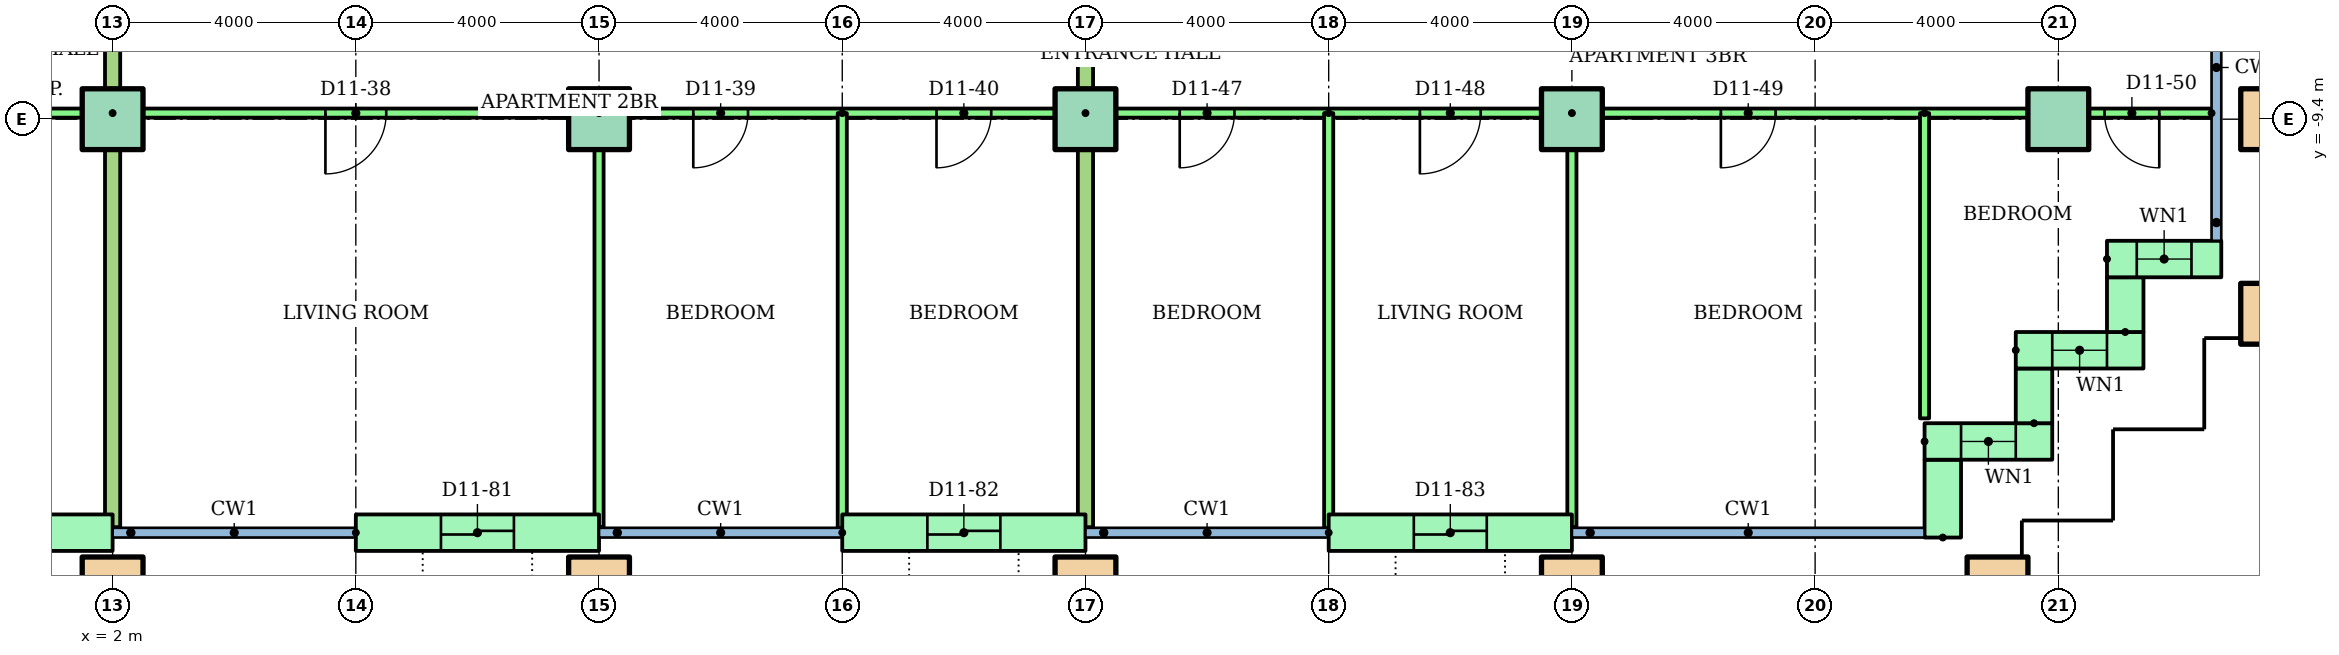
"""IFC4 building model, lengths in metres.
Left out: names, types, materials, properties, quantities, classifications, styles, units other than length and angle.
Written with IfcOpenShell. Run it as: python <this file> out.ifc"""

import sys

from ifc_helpers import new_model, si_unit, direction, frame, frame_2d, origin, origin_2d, place, context, subcontext, project, spatial, rectangle, hollow_rectangle, extrude, element, fill, save


model = new_model("IFC4")
c1 = context("Model", 3, precision=1e-05, world=origin(), true_north=direction((0.0, 1.0)))
c2 = subcontext(c1, "Body", "Model", "MODEL_VIEW")
j1 = project(units=[si_unit("LENGTHUNIT", "METRE"), si_unit("PLANEANGLEUNIT", "RADIAN")], contexts=[c1])
p1 = place(None, origin())
s1 = spatial("IfcSite", under=j1, at=p1, CompositionType="ELEMENT")
p2 = place(p1, origin())
s2 = spatial("IfcBuilding", under=s1, at=p2, CompositionType="ELEMENT")
p3 = place(p2, frame((0.0, 0.0, 44.8)))
s3 = spatial("IfcBuildingStorey", under=s2, at=p3, CompositionType="ELEMENT", Elevation=44.8)
for number, where in (
    (1, (2.0, -17.1, 0.0)),
    (2, (10.0, -17.1, 0.0)),
    (3, (18.0, -17.1, 0.0)),
    (4, (26.0, -17.1, 0.0)),
    (5, (33.0, -17.1, 0.0)),
    (6, (37.5, -12.6, 0.0)),
):
    element("IfcColumn", number, at=place(p3, frame(where)), inside=s3, PredefinedType="COLUMN", context=c2, shape_type="SweptSolid", body=[
        extrude(hollow_rectangle(XDim=1.0, YDim=1.0, WallThickness=0.05, at=origin_2d()), origin(), (0.0, 0.0, 1.0), 3.2),
    ])
for number, where in (
    (7, (2.0, -9.4, 0.0)),
    (8, (10.0, -9.4, 0.0)),
    (9, (18.0, -9.4, 0.0)),
    (10, (26.0, -9.4, 0.0)),
    (11, (34.0, -9.4, 0.0)),
):
    element("IfcColumn", number, at=place(p3, frame(where)), inside=s3, PredefinedType="COLUMN", context=c2, shape_type="SweptSolid", body=[
        extrude(rectangle(XDim=1.0, YDim=1.0, at=origin_2d()), origin(), (0.0, 0.0, 1.0), 3.2),
    ])
p4 = place(p3, frame((37.5, -9.4, 0.0)))
e12 = element("IfcColumn", 12, at=p4, inside=s3, PredefinedType="COLUMN", context=c2, shape_type="SweptSolid", body=[
    extrude(hollow_rectangle(XDim=1.0, YDim=1.0, WallThickness=0.05, at=origin_2d()), origin(), (0.0, 0.0, 1.0), 3.2),
])
p5 = place(p3, frame((-2.0, -16.2, 0.0)))
e13 = element("IfcWall", 13, at=p5, inside=s3, PredefinedType="STANDARD", context=c2, shape_type="SweptSolid", body=[
    extrude(rectangle(XDim=4.0, YDim=0.6, at=frame_2d((2.0, 0.0))), origin(), (0.0, 0.0, 1.0), 2.92),
])
p6 = place(p5, frame((1.4, 0.0, 0.0)))
e14 = element("IfcOpeningElement", 14, at=p6, cuts=e13, PredefinedType="OPENING", context=c2, shape_type="SweptSolid", body=[
    extrude(rectangle(XDim=1.2, YDim=2.1, at=frame_2d((0.6, 1.05))), frame((0.0, 0.31, 0.0), z_axis=(0.0, -1.0, 0.0), x_axis=(1.0, 0.0, 0.0)), (0.0, 0.0, 1.0), 0.62),
])
p7 = place(p3, frame((6.0, -16.2, 0.0)))
e15 = element("IfcWall", 15, at=p7, inside=s3, PredefinedType="STANDARD", context=c2, shape_type="SweptSolid", body=[
    extrude(rectangle(XDim=4.0, YDim=0.6, at=frame_2d((2.0, 0.0))), origin(), (0.0, 0.0, 1.0), 2.92),
])
p8 = place(p7, frame((1.4, 0.0, 0.0)))
e16 = element("IfcOpeningElement", 16, at=p8, cuts=e15, PredefinedType="OPENING", context=c2, shape_type="SweptSolid", body=[
    extrude(rectangle(XDim=1.2, YDim=2.1, at=frame_2d((0.6, 1.05))), frame((0.0, 0.31, 0.0), z_axis=(0.0, -1.0, 0.0), x_axis=(1.0, 0.0, 0.0)), (0.0, 0.0, 1.0), 0.62),
])
p9 = place(p3, frame((14.0, -16.2, 0.0)))
e17 = element("IfcWall", 17, at=p9, inside=s3, PredefinedType="STANDARD", context=c2, shape_type="SweptSolid", body=[
    extrude(rectangle(XDim=4.0, YDim=0.6, at=frame_2d((2.0, 0.0))), origin(), (0.0, 0.0, 1.0), 2.92),
])
p10 = place(p9, frame((1.4, 0.0, 0.0)))
e18 = element("IfcOpeningElement", 18, at=p10, cuts=e17, PredefinedType="OPENING", context=c2, shape_type="SweptSolid", body=[
    extrude(rectangle(XDim=1.2, YDim=2.1, at=frame_2d((0.6, 1.05))), frame((0.0, 0.31, 0.0), z_axis=(0.0, -1.0, 0.0), x_axis=(1.0, 0.0, 0.0)), (0.0, 0.0, 1.0), 0.62),
])
p11 = place(p3, frame((22.0, -16.2, 0.0)))
e19 = element("IfcWall", 19, at=p11, inside=s3, PredefinedType="STANDARD", context=c2, shape_type="SweptSolid", body=[
    extrude(rectangle(XDim=4.0, YDim=0.6, at=frame_2d((2.0, 0.0))), origin(), (0.0, 0.0, 1.0), 2.92),
])
p12 = place(p11, frame((1.4, 0.0, 0.0)))
e20 = element("IfcOpeningElement", 20, at=p12, cuts=e19, PredefinedType="OPENING", context=c2, shape_type="SweptSolid", body=[
    extrude(rectangle(XDim=1.2, YDim=2.1, at=frame_2d((0.6, 1.05))), frame((0.0, 0.31, 0.0), z_axis=(0.0, -1.0, 0.0), x_axis=(1.0, 0.0, 0.0)), (0.0, 0.0, 1.0), 0.62),
])
p13 = place(p3, frame((32.1, -16.28, 0.0), z_axis=(0.0, 0.0, 1.0), x_axis=(0.0, 1.0, 0.0)))
e21 = element("IfcWall", 21, at=p13, inside=s3, PredefinedType="STANDARD", context=c2, shape_type="SweptSolid", body=[
    extrude(rectangle(XDim=1.28, YDim=0.6, at=frame_2d((0.64, 0.0))), origin(), (0.0, 0.0, 1.0), 2.92),
])
p14 = place(p3, frame((31.8, -14.7, 0.0)))
e22 = element("IfcWall", 22, at=p14, inside=s3, PredefinedType="STANDARD", context=c2, shape_type="SweptSolid", body=[
    extrude(rectangle(XDim=2.1, YDim=0.6, at=frame_2d((1.05, 0.0))), origin(), (0.0, 0.0, 1.0), 2.92),
])
p15 = place(p14, frame((0.6, 0.0, 0.9)))
e23 = element("IfcOpeningElement", 23, at=p15, cuts=e22, PredefinedType="OPENING", context=c2, shape_type="SweptSolid", body=[
    extrude(rectangle(XDim=0.9, YDim=1.5, at=frame_2d((0.45, 0.75))), frame((0.0, 0.31, 0.0), z_axis=(0.0, -1.0, 0.0), x_axis=(1.0, 0.0, 0.0)), (0.0, 0.0, 1.0), 0.62),
])
p16 = place(p3, frame((33.6, -14.4, 0.0), z_axis=(0.0, 0.0, 1.0), x_axis=(0.0, 1.0, 0.0)))
e24 = element("IfcWall", 24, at=p16, inside=s3, PredefinedType="STANDARD", context=c2, shape_type="SweptSolid", body=[
    extrude(rectangle(XDim=0.9, YDim=0.6, at=frame_2d((0.45, 0.0))), origin(), (0.0, 0.0, 1.0), 2.92),
])
p17 = place(p3, frame((33.3, -13.2, 0.0)))
e25 = element("IfcWall", 25, at=p17, inside=s3, PredefinedType="STANDARD", context=c2, shape_type="SweptSolid", body=[
    extrude(rectangle(XDim=2.1, YDim=0.6, at=frame_2d((1.05, 0.0))), origin(), (0.0, 0.0, 1.0), 2.92),
])
p18 = place(p17, frame((0.6, 0.0, 0.9)))
e26 = element("IfcOpeningElement", 26, at=p18, cuts=e25, PredefinedType="OPENING", context=c2, shape_type="SweptSolid", body=[
    extrude(rectangle(XDim=0.9, YDim=1.5, at=frame_2d((0.45, 0.75))), frame((0.0, 0.31, 0.0), z_axis=(0.0, -1.0, 0.0), x_axis=(1.0, 0.0, 0.0)), (0.0, 0.0, 1.0), 0.62),
])
p19 = place(p3, frame((35.1, -12.9, 0.0), z_axis=(0.0, 0.0, 1.0), x_axis=(0.0, 1.0, 0.0)))
e27 = element("IfcWall", 27, at=p19, inside=s3, PredefinedType="STANDARD", context=c2, shape_type="SweptSolid", body=[
    extrude(rectangle(XDim=0.9, YDim=0.6, at=frame_2d((0.45, 0.0))), origin(), (0.0, 0.0, 1.0), 2.92),
])
p20 = place(p3, frame((34.8, -11.7, 0.0)))
e28 = element("IfcWall", 28, at=p20, inside=s3, PredefinedType="STANDARD", context=c2, shape_type="SweptSolid", body=[
    extrude(rectangle(XDim=1.88, YDim=0.6, at=frame_2d((0.94, 0.0))), origin(), (0.0, 0.0, 1.0), 2.92),
])
p21 = place(p20, frame((0.49, 0.0, 0.9)))
e29 = element("IfcOpeningElement", 29, at=p21, cuts=e28, PredefinedType="OPENING", context=c2, shape_type="SweptSolid", body=[
    extrude(rectangle(XDim=0.9, YDim=1.5, at=frame_2d((0.45, 0.75))), frame((0.0, 0.31, 0.0), z_axis=(0.0, -1.0, 0.0), x_axis=(1.0, 0.0, 0.0)), (0.0, 0.0, 1.0), 0.62),
])
p22 = place(p3, frame((2.0, -9.3, 0.0), z_axis=(0.0, 0.0, 1.0), x_axis=(-1.0, 0.0, 0.0)))
e30 = element("IfcWall", 30, at=p22, inside=s3, PredefinedType="PARTITIONING", context=c2, shape_type="SweptSolid", body=[
    extrude(rectangle(XDim=24.0, YDim=0.15, at=frame_2d((12.0, 0.0))), origin(), (0.0, 0.0, 1.0), 2.4),
])
p23 = place(p22, frame((19.5, 0.0, 0.0)))
e31 = element("IfcOpeningElement", 31, at=p23, cuts=e30, PredefinedType="OPENING", context=c2, shape_type="SweptSolid", body=[
    extrude(rectangle(XDim=1.0, YDim=2.1, at=frame_2d((0.5, 1.05))), frame((0.0, 0.085, 0.0), z_axis=(0.0, -1.0, 0.0), x_axis=(1.0, 0.0, 0.0)), (0.0, 0.0, 1.0), 0.17),
])
p24 = place(p22, frame((13.55, 0.0, 0.0)))
e32 = element("IfcOpeningElement", 32, at=p24, cuts=e30, PredefinedType="OPENING", context=c2, shape_type="SweptSolid", body=[
    extrude(rectangle(XDim=0.9, YDim=2.1, at=frame_2d((0.45, 1.05))), frame((0.0, 0.085, 0.0), z_axis=(0.0, -1.0, 0.0), x_axis=(1.0, 0.0, 0.0)), (0.0, 0.0, 1.0), 0.17),
])
p25 = place(p22, frame((9.55, 0.0, 0.0)))
e33 = element("IfcOpeningElement", 33, at=p25, cuts=e30, PredefinedType="OPENING", context=c2, shape_type="SweptSolid", body=[
    extrude(rectangle(XDim=0.9, YDim=2.1, at=frame_2d((0.45, 1.05))), frame((0.0, 0.085, 0.0), z_axis=(0.0, -1.0, 0.0), x_axis=(1.0, 0.0, 0.0)), (0.0, 0.0, 1.0), 0.17),
])
p26 = place(p22, frame((5.55, 0.0, 0.0)))
e34 = element("IfcOpeningElement", 34, at=p26, cuts=e30, PredefinedType="OPENING", context=c2, shape_type="SweptSolid", body=[
    extrude(rectangle(XDim=0.9, YDim=2.1, at=frame_2d((0.45, 1.05))), frame((0.0, 0.085, 0.0), z_axis=(0.0, -1.0, 0.0), x_axis=(1.0, 0.0, 0.0)), (0.0, 0.0, 1.0), 0.17),
])
p27 = place(p22, frame((1.55, 0.0, 0.0)))
e35 = element("IfcOpeningElement", 35, at=p27, cuts=e30, PredefinedType="OPENING", context=c2, shape_type="SweptSolid", body=[
    extrude(rectangle(XDim=0.9, YDim=2.1, at=frame_2d((0.45, 1.05))), frame((0.0, 0.085, 0.0), z_axis=(0.0, -1.0, 0.0), x_axis=(1.0, 0.0, 0.0)), (0.0, 0.0, 1.0), 0.17),
])
p28 = place(p3, frame((18.0, -9.3, 0.0), z_axis=(0.0, 0.0, 1.0), x_axis=(-1.0, 0.0, 0.0)))
e36 = element("IfcWall", 36, at=p28, inside=s3, PredefinedType="PARTITIONING", context=c2, shape_type="SweptSolid", body=[
    extrude(rectangle(XDim=16.0, YDim=0.15, at=frame_2d((8.0, 0.0))), origin(), (0.0, 0.0, 1.0), 2.4),
])
p29 = place(p28, frame((11.5, 0.0, 0.0)))
e37 = element("IfcOpeningElement", 37, at=p29, cuts=e36, PredefinedType="OPENING", context=c2, shape_type="SweptSolid", body=[
    extrude(rectangle(XDim=1.0, YDim=2.1, at=frame_2d((0.5, 1.05))), frame((0.0, 0.085, 0.0), z_axis=(0.0, -1.0, 0.0), x_axis=(1.0, 0.0, 0.0)), (0.0, 0.0, 1.0), 0.17),
])
p30 = place(p28, frame((5.55, 0.0, 0.0)))
e38 = element("IfcOpeningElement", 38, at=p30, cuts=e36, PredefinedType="OPENING", context=c2, shape_type="SweptSolid", body=[
    extrude(rectangle(XDim=0.9, YDim=2.1, at=frame_2d((0.45, 1.05))), frame((0.0, 0.085, 0.0), z_axis=(0.0, -1.0, 0.0), x_axis=(1.0, 0.0, 0.0)), (0.0, 0.0, 1.0), 0.17),
])
p31 = place(p28, frame((1.55, 0.0, 0.0)))
e39 = element("IfcOpeningElement", 39, at=p31, cuts=e36, PredefinedType="OPENING", context=c2, shape_type="SweptSolid", body=[
    extrude(rectangle(XDim=0.9, YDim=2.1, at=frame_2d((0.45, 1.05))), frame((0.0, 0.085, 0.0), z_axis=(0.0, -1.0, 0.0), x_axis=(1.0, 0.0, 0.0)), (0.0, 0.0, 1.0), 0.17),
])
p32 = place(p3, frame((10.0, -9.3, 0.0), z_axis=(0.0, 0.0, 1.0), x_axis=(0.0, -1.0, 0.0)))
e40 = element("IfcWall", 40, at=p32, inside=s3, PredefinedType="PARTITIONING", context=c2, shape_type="SweptSolid", body=[
    extrude(rectangle(XDim=6.81, YDim=0.15, at=frame_2d((3.405, 0.0))), origin(), (0.0, 0.0, 1.0), 2.4),
])
p33 = place(p3, frame((14.0, -9.3, 0.0), z_axis=(0.0, 0.0, 1.0), x_axis=(0.0, -1.0, 0.0)))
e41 = element("IfcWall", 41, at=p33, inside=s3, PredefinedType="PARTITIONING", context=c2, shape_type="SweptSolid", body=[
    extrude(rectangle(XDim=6.821, YDim=0.15, at=frame_2d((3.411, 0.0))), origin(), (0.0, 0.0, 1.0), 2.4),
])
p34 = place(p3, frame((2.0, -1.4, 0.0), z_axis=(0.0, 0.0, 1.0), x_axis=(0.0, -1.0, 0.0)))
e42 = element("IfcWall", 42, at=p34, inside=s3, PredefinedType="PARTITIONING", context=c2, shape_type="SweptSolid", body=[
    extrude(rectangle(XDim=14.71, YDim=0.25, at=frame_2d((7.355, 0.0))), origin(), (0.0, 0.0, 1.0), 2.4),
])
p35 = place(p3, frame((36.52, -9.3, 0.0), z_axis=(0.0, 0.0, 1.0), x_axis=(-1.0, 0.0, 0.0)))
e43 = element("IfcWall", 43, at=p35, inside=s3, PredefinedType="PARTITIONING", context=c2, shape_type="SweptSolid", body=[
    extrude(rectangle(XDim=18.52, YDim=0.15, at=frame_2d((9.26, 0.0))), origin(), (0.0, 0.0, 1.0), 2.4),
])
p36 = place(p35, frame((16.07, 0.0, 0.0)))
e44 = element("IfcOpeningElement", 44, at=p36, cuts=e43, PredefinedType="OPENING", context=c2, shape_type="SweptSolid", body=[
    extrude(rectangle(XDim=0.9, YDim=2.1, at=frame_2d((0.45, 1.05))), frame((0.0, 0.085, 0.0), z_axis=(0.0, -1.0, 0.0), x_axis=(1.0, 0.0, 0.0)), (0.0, 0.0, 1.0), 0.17),
])
p37 = place(p35, frame((12.02, 0.0, 0.0)))
e45 = element("IfcOpeningElement", 45, at=p37, cuts=e43, PredefinedType="OPENING", context=c2, shape_type="SweptSolid", body=[
    extrude(rectangle(XDim=1.0, YDim=2.1, at=frame_2d((0.5, 1.05))), frame((0.0, 0.085, 0.0), z_axis=(0.0, -1.0, 0.0), x_axis=(1.0, 0.0, 0.0)), (0.0, 0.0, 1.0), 0.17),
])
p38 = place(p35, frame((7.17, 0.0, 0.0)))
e46 = element("IfcOpeningElement", 46, at=p38, cuts=e43, PredefinedType="OPENING", context=c2, shape_type="SweptSolid", body=[
    extrude(rectangle(XDim=0.9, YDim=2.1, at=frame_2d((0.45, 1.05))), frame((0.0, 0.085, 0.0), z_axis=(0.0, -1.0, 0.0), x_axis=(1.0, 0.0, 0.0)), (0.0, 0.0, 1.0), 0.17),
])
p39 = place(p35, frame((0.86, 0.0, 0.0)))
e47 = element("IfcOpeningElement", 47, at=p39, cuts=e43, PredefinedType="OPENING", context=c2, shape_type="SweptSolid", body=[
    extrude(rectangle(XDim=0.9, YDim=2.1, at=frame_2d((0.45, 1.05))), frame((0.0, 0.085, 0.0), z_axis=(0.0, -1.0, 0.0), x_axis=(1.0, 0.0, 0.0)), (0.0, 0.0, 1.0), 0.17),
])
p40 = place(p3, frame((22.0, -9.3, 0.0), z_axis=(0.0, 0.0, 1.0), x_axis=(0.0, -1.0, 0.0)))
e48 = element("IfcWall", 48, at=p40, inside=s3, PredefinedType="PARTITIONING", context=c2, shape_type="SweptSolid", body=[
    extrude(rectangle(XDim=6.821, YDim=0.15, at=frame_2d((3.411, 0.0))), origin(), (0.0, 0.0, 1.0), 2.4),
])
p41 = place(p3, frame((26.0, -9.3, 0.0), z_axis=(0.0, 0.0, 1.0), x_axis=(0.0, -1.0, 0.0)))
e49 = element("IfcWall", 49, at=p41, inside=s3, PredefinedType="PARTITIONING", context=c2, shape_type="SweptSolid", body=[
    extrude(rectangle(XDim=6.81, YDim=0.15, at=frame_2d((3.405, 0.0))), origin(), (0.0, 0.0, 1.0), 2.4),
])
p42 = place(p3, frame((31.8, -9.3, 0.0), z_axis=(0.0, 0.0, 1.0), x_axis=(0.0, -1.0, 0.0)))
e50 = element("IfcWall", 50, at=p42, inside=s3, PredefinedType="PARTITIONING", context=c2, shape_type="SweptSolid", body=[
    extrude(rectangle(XDim=5.02, YDim=0.15, at=frame_2d((2.51, 0.0))), origin(), (0.0, 0.0, 1.0), 2.4),
])
p43 = place(p3, frame((18.0, -1.4, 0.0), z_axis=(0.0, 0.0, 1.0), x_axis=(0.0, -1.0, 0.0)))
e51 = element("IfcWall", 51, at=p43, inside=s3, PredefinedType="PARTITIONING", context=c2, shape_type="SweptSolid", body=[
    extrude(rectangle(XDim=14.71, YDim=0.25, at=frame_2d((7.355, 0.0))), origin(), (0.0, 0.0, 1.0), 2.4),
])
p44 = place(p15, origin())
e52 = element("IfcWindow", 52, at=p44, inside=s3, PartitioningType="SINGLE_PANEL", PredefinedType="WINDOW", context=c2, shape_type="SweptSolid", body=[
    extrude(rectangle(XDim=0.9, YDim=1.5, at=frame_2d((0.45, 0.75))), frame((0.0, 0.03, 0.0), z_axis=(0.0, -1.0, 0.0), x_axis=(1.0, 0.0, 0.0)), (0.0, 0.0, 1.0), 0.06),
])
fill(e23, e52)
p45 = place(p18, origin())
e53 = element("IfcWindow", 53, at=p45, inside=s3, PartitioningType="SINGLE_PANEL", PredefinedType="WINDOW", context=c2, shape_type="SweptSolid", body=[
    extrude(rectangle(XDim=0.9, YDim=1.5, at=frame_2d((0.45, 0.75))), frame((0.0, 0.03, 0.0), z_axis=(0.0, -1.0, 0.0), x_axis=(1.0, 0.0, 0.0)), (0.0, 0.0, 1.0), 0.06),
])
fill(e26, e53)
p46 = place(p21, origin())
e54 = element("IfcWindow", 54, at=p46, inside=s3, PartitioningType="SINGLE_PANEL", PredefinedType="WINDOW", context=c2, shape_type="SweptSolid", body=[
    extrude(rectangle(XDim=0.9, YDim=1.5, at=frame_2d((0.45, 0.75))), frame((0.0, 0.03, 0.0), z_axis=(0.0, -1.0, 0.0), x_axis=(1.0, 0.0, 0.0)), (0.0, 0.0, 1.0), 0.06),
])
fill(e29, e54)
p47 = place(p29, origin())
e55 = element("IfcDoor", 55, at=p47, inside=s3, OperationType="SINGLE_SWING_RIGHT", PredefinedType="DOOR", context=c2, shape_type="SweptSolid", body=[
    extrude(rectangle(XDim=1.0, YDim=2.1, at=frame_2d((0.5, 1.05))), frame((0.0, 0.025, 0.0), z_axis=(0.0, -1.0, 0.0), x_axis=(1.0, 0.0, 0.0)), (0.0, 0.0, 1.0), 0.05),
])
fill(e37, e55)
p48 = place(p30, origin())
e56 = element("IfcDoor", 56, at=p48, inside=s3, OperationType="SINGLE_SWING_RIGHT", PredefinedType="DOOR", context=c2, shape_type="SweptSolid", body=[
    extrude(rectangle(XDim=0.9, YDim=2.1, at=frame_2d((0.45, 1.05))), frame((0.0, 0.025, 0.0), z_axis=(0.0, -1.0, 0.0), x_axis=(1.0, 0.0, 0.0)), (0.0, 0.0, 1.0), 0.05),
])
fill(e38, e56)
p49 = place(p31, origin())
e57 = element("IfcDoor", 57, at=p49, inside=s3, OperationType="SINGLE_SWING_RIGHT", PredefinedType="DOOR", context=c2, shape_type="SweptSolid", body=[
    extrude(rectangle(XDim=0.9, YDim=2.1, at=frame_2d((0.45, 1.05))), frame((0.0, 0.025, 0.0), z_axis=(0.0, -1.0, 0.0), x_axis=(1.0, 0.0, 0.0)), (0.0, 0.0, 1.0), 0.05),
])
fill(e39, e57)
p50 = place(p36, origin())
e58 = element("IfcDoor", 58, at=p50, inside=s3, OperationType="SINGLE_SWING_RIGHT", PredefinedType="DOOR", context=c2, shape_type="SweptSolid", body=[
    extrude(rectangle(XDim=0.9, YDim=2.1, at=frame_2d((0.45, 1.05))), frame((0.0, 0.025, 0.0), z_axis=(0.0, -1.0, 0.0), x_axis=(1.0, 0.0, 0.0)), (0.0, 0.0, 1.0), 0.05),
])
fill(e44, e58)
p51 = place(p37, origin())
e59 = element("IfcDoor", 59, at=p51, inside=s3, OperationType="SINGLE_SWING_RIGHT", PredefinedType="DOOR", context=c2, shape_type="SweptSolid", body=[
    extrude(rectangle(XDim=1.0, YDim=2.1, at=frame_2d((0.5, 1.05))), frame((0.0, 0.025, 0.0), z_axis=(0.0, -1.0, 0.0), x_axis=(1.0, 0.0, 0.0)), (0.0, 0.0, 1.0), 0.05),
])
fill(e45, e59)
p52 = place(p38, origin())
e60 = element("IfcDoor", 60, at=p52, inside=s3, OperationType="SINGLE_SWING_RIGHT", PredefinedType="DOOR", context=c2, shape_type="SweptSolid", body=[
    extrude(rectangle(XDim=0.9, YDim=2.1, at=frame_2d((0.45, 1.05))), frame((0.0, 0.025, 0.0), z_axis=(0.0, -1.0, 0.0), x_axis=(1.0, 0.0, 0.0)), (0.0, 0.0, 1.0), 0.05),
])
fill(e46, e60)
p53 = place(p39, origin())
e61 = element("IfcDoor", 61, at=p53, inside=s3, OperationType="SINGLE_SWING_LEFT", PredefinedType="DOOR", context=c2, shape_type="SweptSolid", body=[
    extrude(rectangle(XDim=0.9, YDim=2.1, at=frame_2d((0.45, 1.05))), frame((0.0, 0.025, 0.0), z_axis=(0.0, -1.0, 0.0), x_axis=(1.0, 0.0, 0.0)), (0.0, 0.0, 1.0), 0.05),
])
fill(e47, e61)
p54 = place(p8, origin())
e62 = element("IfcDoor", 62, at=p54, inside=s3, OperationType="SLIDING_TO_LEFT", PredefinedType="DOOR", context=c2, shape_type="SweptSolid", body=[
    extrude(rectangle(XDim=1.2, YDim=2.1, at=frame_2d((0.6, 1.05))), frame((0.0, 0.025, 0.0), z_axis=(0.0, -1.0, 0.0), x_axis=(1.0, 0.0, 0.0)), (0.0, 0.0, 1.0), 0.05),
])
fill(e16, e62)
p55 = place(p10, origin())
e63 = element("IfcDoor", 63, at=p55, inside=s3, OperationType="SLIDING_TO_LEFT", PredefinedType="DOOR", context=c2, shape_type="SweptSolid", body=[
    extrude(rectangle(XDim=1.2, YDim=2.1, at=frame_2d((0.6, 1.05))), frame((0.0, 0.025, 0.0), z_axis=(0.0, -1.0, 0.0), x_axis=(1.0, 0.0, 0.0)), (0.0, 0.0, 1.0), 0.05),
])
fill(e18, e63)
p56 = place(p12, origin())
e64 = element("IfcDoor", 64, at=p56, inside=s3, OperationType="SLIDING_TO_LEFT", PredefinedType="DOOR", context=c2, shape_type="SweptSolid", body=[
    extrude(rectangle(XDim=1.2, YDim=2.1, at=frame_2d((0.6, 1.05))), frame((0.0, 0.025, 0.0), z_axis=(0.0, -1.0, 0.0), x_axis=(1.0, 0.0, 0.0)), (0.0, 0.0, 1.0), 0.05),
])
fill(e20, e64)
save(model, sys.argv[1])
